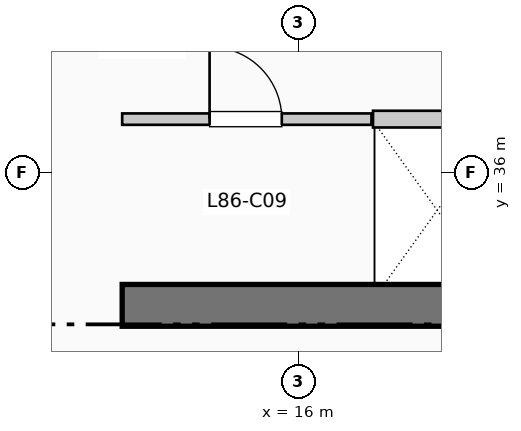
"""IFC4 building model, lengths in metres.
Left out: names, types, materials, properties, quantities, classifications, styles, units other than length and angle.
Written with IfcOpenShell. Run it as: python <this file> out.ifc"""

import sys

from ifc_helpers import new_model, si_unit, direction, frame, frame_2d, origin, place, context, subcontext, project, spatial, rectangle, extrude, element, fill, save


model = new_model("IFC4")
c1 = context("Model", 3, precision=1e-05, world=origin(), true_north=direction((0.0, 1.0)))
c2 = subcontext(c1, "Body", "Model", "MODEL_VIEW")
j1 = project(units=[si_unit("LENGTHUNIT", "METRE"), si_unit("PLANEANGLEUNIT", "RADIAN")], contexts=[c1])
p1 = place(None, origin())
s1 = spatial("IfcSite", under=j1, at=p1, CompositionType="ELEMENT")
p2 = place(p1, origin())
s2 = spatial("IfcBuilding", under=s1, at=p2, CompositionType="ELEMENT")
p3 = place(p2, frame((0.0, 0.0, 352.11)))
s3 = spatial("IfcBuildingStorey", under=s2, at=p3, CompositionType="ELEMENT", Elevation=352.11)
p4 = place(p3, frame((13.68, 34.25, 0.0), z_axis=(0.0, 0.0, 1.0), x_axis=(1.0, 0.0, 0.0)))
e1 = element("IfcWall", 1, at=p4, inside=s3, PredefinedType="SHEAR", context=c2, shape_type="SweptSolid", body=[
    extrude(rectangle(XDim=6.12, YDim=0.55, at=frame_2d((3.06, 0.0))), origin(), (0.0, 0.0, 1.0), 4.62),
])
p5 = place(p3, frame((13.68, 36.7, 0.0), z_axis=(0.0, 0.0, 1.0), x_axis=(1.0, 0.0, 0.0)))
e2 = element("IfcWall", 2, at=p5, inside=s3, PredefinedType="PARTITIONING", context=c2, shape_type="SweptSolid", body=[
    extrude(rectangle(XDim=3.28, YDim=0.15, at=frame_2d((1.64, 0.0))), origin(), (0.0, 0.0, 1.0), 4.37),
])
p6 = place(p5, frame((1.15, 0.0, 0.0)))
e3 = element("IfcOpeningElement", 3, at=p6, cuts=e2, PredefinedType="OPENING", context=c2, shape_type="SweptSolid", body=[
    extrude(rectangle(XDim=0.95, YDim=2.15, at=frame_2d((0.475, 1.075))), frame((0.0, 0.085, 0.0), z_axis=(0.0, -1.0, 0.0), x_axis=(1.0, 0.0, 0.0)), (0.0, 0.0, 1.0), 0.17),
])
p7 = place(p3, frame((16.98, 36.7, 0.0), z_axis=(0.0, 0.0, 1.0), x_axis=(1.0, 0.0, 0.0)))
e4 = element("IfcWall", 4, at=p7, inside=s3, PredefinedType="PARTITIONING", context=c2, shape_type="SweptSolid", body=[
    extrude(rectangle(XDim=1.7, YDim=0.22, at=frame_2d((0.85, 0.0))), origin(), (0.0, 0.0, 1.0), 4.37),
])
p8 = place(p6, origin())
e5 = element("IfcDoor", 5, at=p8, inside=s3, OperationType="SINGLE_SWING_LEFT", PredefinedType="DOOR", context=c2, shape_type="SweptSolid", body=[
    extrude(rectangle(XDim=0.95, YDim=2.15, at=frame_2d((0.475, 1.075))), frame((0.0, 0.025, 0.0), z_axis=(0.0, -1.0, 0.0), x_axis=(1.0, 0.0, 0.0)), (0.0, 0.0, 1.0), 0.05),
])
fill(e3, e5)
save(model, sys.argv[1])
